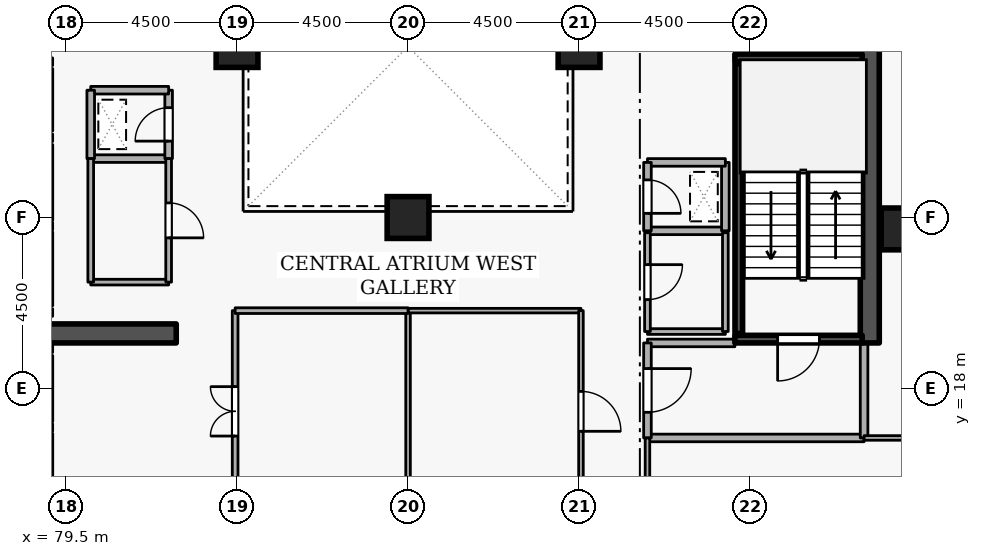
"""IFC4 building model, lengths in metres.
Left out: names, types, materials, properties, quantities, classifications, styles, units other than length and angle.
Written with IfcOpenShell. Run it as: python <this file> out.ifc"""

import sys

from ifc_helpers import new_model, si_unit, direction, frame, frame_2d, origin, origin_2d, place, context, subcontext, project, spatial, rectangle, extrude, element, fill, save


model = new_model("IFC4")
c1 = context("Model", 3, precision=1e-05, world=origin(), true_north=direction((0.0, 1.0)))
c2 = subcontext(c1, "Body", "Model", "MODEL_VIEW")
j1 = project(units=[si_unit("LENGTHUNIT", "METRE"), si_unit("PLANEANGLEUNIT", "RADIAN")], contexts=[c1])
p1 = place(None, origin())
s1 = spatial("IfcSite", under=j1, at=p1, CompositionType="ELEMENT")
p2 = place(p1, origin())
s2 = spatial("IfcBuilding", under=s1, at=p2, CompositionType="ELEMENT")
p3 = place(p2, frame((0.0, 0.0, 182.1)))
s3 = spatial("IfcBuildingStorey", under=s2, at=p3, CompositionType="ELEMENT", Elevation=182.1)
p4 = place(p3, frame((100.65, 19.2, 0.0), z_axis=(0.0, 0.0, 1.0), x_axis=(0.0, 1.0, 0.0)))
e1 = element("IfcWall", 1, at=p4, inside=s3, PredefinedType="SHEAR", context=c2, shape_type="SweptSolid", body=[
    extrude(rectangle(XDim=15.6, YDim=0.5, at=frame_2d((7.8, 0.0))), origin(), (0.0, 0.0, 1.0), 3.6),
])
p5 = place(p3, frame((76.6, 19.45, 0.0), z_axis=(0.0, 0.0, 1.0), x_axis=(1.0, 0.0, 0.0)))
e2 = element("IfcWall", 2, at=p5, inside=s3, PredefinedType="SHEAR", context=c2, shape_type="SweptSolid", body=[
    extrude(rectangle(XDim=5.8, YDim=0.5, at=frame_2d((2.9, 0.0))), origin(), (0.0, 0.0, 1.0), 3.6),
])
for number, where, z_axis, x_axis in (
    (3, (101.5, 22.2, 0.0), (0.0, 0.0, 1.0), (1.0, 0.0, 0.0)),
    (4, (93.0, 27.0, 0.0), (0.0, 0.0, 1.0), (1.0, 0.0, 0.0)),
    (5, (84.0, 27.0, 0.0), (0.0, 0.0, 1.0), (1.0, 0.0, 0.0)),
    (6, (88.5, 22.5, 0.0), (0.0, 0.0, 1.0), (1.0, 0.0, 0.0)),
):
    element("IfcColumn", number, at=place(p3, frame(where, z_axis=z_axis, x_axis=x_axis)), inside=s3, PredefinedType="COLUMN", context=c2, shape_type="SweptSolid", body=[
        extrude(rectangle(XDim=1.1, YDim=1.1, at=origin_2d()), origin(), (0.0, 0.0, 1.0), 3.6),
    ])
p6 = place(p3, frame((79.05, 24.78, 0.0), z_axis=(0.0, 0.0, 1.0), x_axis=(0.0, 1.0, 0.0)))
e7 = element("IfcWall", 7, at=p6, inside=s3, PredefinedType="STANDARD", context=c2, shape_type="SweptSolid", body=[
    extrude(rectangle(XDim=1.64, YDim=0.2, at=frame_2d((0.82, 0.0))), origin(), (0.0, 0.0, 1.0), 3.34),
])
p7 = place(p6, frame((0.31, 0.0, 0.0)))
e8 = element("IfcOpeningElement", 8, at=p7, cuts=e7, PredefinedType="OPENING", context=c2, shape_type="SweptSolid", body=[
    extrude(rectangle(XDim=1.02, YDim=2.06, at=frame_2d((0.51, 1.03))), frame((0.0, 0.11, 0.0), z_axis=(0.0, -1.0, 0.0), x_axis=(1.0, 0.0, 0.0)), (0.0, 0.0, 1.0), 0.22),
])
p8 = place(p3, frame((79.05, 22.43, 0.0), z_axis=(0.0, 0.0, 1.0), x_axis=(0.0, 1.0, 0.0)))
e9 = element("IfcWall", 9, at=p8, inside=s3, PredefinedType="STANDARD", context=c2, shape_type="SweptSolid", body=[
    extrude(rectangle(XDim=1.99, YDim=0.2, at=frame_2d((0.995, 0.0))), origin(), (0.0, 0.0, 1.0), 3.34),
])
p9 = place(p8, frame((0.485, 0.0, 0.0)))
e10 = element("IfcOpeningElement", 10, at=p9, cuts=e9, PredefinedType="OPENING", context=c2, shape_type="SweptSolid", body=[
    extrude(rectangle(XDim=1.02, YDim=2.06, at=frame_2d((0.51, 1.03))), frame((0.0, 0.11, 0.0), z_axis=(0.0, -1.0, 0.0), x_axis=(1.0, 0.0, 0.0)), (0.0, 0.0, 1.0), 0.22),
])
p10 = place(p3, frame((79.05, 20.18, 0.0), z_axis=(0.0, 0.0, 1.0), x_axis=(0.0, 1.0, 0.0)))
e11 = element("IfcWall", 11, at=p10, inside=s3, PredefinedType="STANDARD", context=c2, shape_type="SweptSolid", body=[
    extrude(rectangle(XDim=1.94, YDim=0.2, at=frame_2d((0.97, 0.0))), origin(), (0.0, 0.0, 1.0), 3.34),
])
p11 = place(p10, frame((0.46, 0.0, 0.0)))
e12 = element("IfcOpeningElement", 12, at=p11, cuts=e11, PredefinedType="OPENING", context=c2, shape_type="SweptSolid", body=[
    extrude(rectangle(XDim=1.02, YDim=2.06, at=frame_2d((0.51, 1.03))), frame((0.0, 0.11, 0.0), z_axis=(0.0, -1.0, 0.0), x_axis=(1.0, 0.0, 0.0)), (0.0, 0.0, 1.0), 0.22),
])
p12 = place(p3, frame((79.05, 17.13, 0.0), z_axis=(0.0, 0.0, 1.0), x_axis=(0.0, 1.0, 0.0)))
e13 = element("IfcWall", 13, at=p12, inside=s3, PredefinedType="STANDARD", context=c2, shape_type="SweptSolid", body=[
    extrude(rectangle(XDim=1.74, YDim=0.2, at=frame_2d((0.87, 0.0))), origin(), (0.0, 0.0, 1.0), 3.34),
])
p13 = place(p12, frame((0.36, 0.0, 0.0)))
e14 = element("IfcOpeningElement", 14, at=p13, cuts=e13, PredefinedType="OPENING", context=c2, shape_type="SweptSolid", body=[
    extrude(rectangle(XDim=1.02, YDim=2.06, at=frame_2d((0.51, 1.03))), frame((0.0, 0.11, 0.0), z_axis=(0.0, -1.0, 0.0), x_axis=(1.0, 0.0, 0.0)), (0.0, 0.0, 1.0), 0.22),
])
p14 = place(p3, frame((79.05, 15.03, 0.0), z_axis=(0.0, 0.0, 1.0), x_axis=(0.0, 1.0, 0.0)))
e15 = element("IfcWall", 15, at=p14, inside=s3, PredefinedType="STANDARD", context=c2, shape_type="SweptSolid", body=[
    extrude(rectangle(XDim=1.79, YDim=0.2, at=frame_2d((0.895, 0.0))), origin(), (0.0, 0.0, 1.0), 3.34),
])
p15 = place(p14, frame((0.385, 0.0, 0.0)))
e16 = element("IfcOpeningElement", 16, at=p15, cuts=e15, PredefinedType="OPENING", context=c2, shape_type="SweptSolid", body=[
    extrude(rectangle(XDim=1.02, YDim=2.06, at=frame_2d((0.51, 1.03))), frame((0.0, 0.11, 0.0), z_axis=(0.0, -1.0, 0.0), x_axis=(1.0, 0.0, 0.0)), (0.0, 0.0, 1.0), 0.22),
])
p16 = place(p3, frame((100.45, 19.3, 0.0), z_axis=(0.0, 0.0, 1.0), x_axis=(-1.0, 0.0, 0.0)))
e17 = element("IfcWall", 17, at=p16, inside=s3, PredefinedType="SHEAR", context=c2, shape_type="SweptSolid", body=[
    extrude(rectangle(XDim=3.35, YDim=0.2, at=frame_2d((1.675, 0.0))), origin(), (0.0, 0.0, 1.0), 3.6),
])
p17 = place(p16, frame((1.125, 0.0, 0.0)))
e18 = element("IfcOpeningElement", 18, at=p17, cuts=e17, PredefinedType="OPENING", context=c2, shape_type="SweptSolid", body=[
    extrude(rectangle(XDim=1.1, YDim=2.1, at=frame_2d((0.55, 1.05))), frame((0.0, 0.11, 0.0), z_axis=(0.0, -1.0, 0.0), x_axis=(1.0, 0.0, 0.0)), (0.0, 0.0, 1.0), 0.22),
])
p18 = place(p3, frame((97.1, 26.7, 0.0), z_axis=(0.0, 0.0, 1.0), x_axis=(1.0, 0.0, 0.0)))
e19 = element("IfcWall", 19, at=p18, inside=s3, PredefinedType="SHEAR", context=c2, shape_type="SweptSolid", body=[
    extrude(rectangle(XDim=3.35, YDim=0.2, at=frame_2d((1.675, 0.0))), origin(), (0.0, 0.0, 1.0), 3.6),
])
p19 = place(p3, frame((97.203, 26.55, 0.0), z_axis=(0.0, 0.0, 1.0), x_axis=(0.0, -1.0, 0.0)))
e20 = element("IfcWall", 20, at=p19, inside=s3, PredefinedType="SHEAR", context=c2, shape_type="SweptSolid", body=[
    extrude(rectangle(XDim=7.1, YDim=0.2, at=frame_2d((3.55, 0.0))), origin(), (0.0, 0.0, 1.0), 3.6),
])
p20 = place(p3, frame((94.8, 16.7, 0.0), z_axis=(0.0, 0.0, 1.0), x_axis=(1.0, 0.0, 0.0)))
e21 = element("IfcWall", 21, at=p20, inside=s3, PredefinedType="STANDARD", context=c2, shape_type="SweptSolid", body=[
    extrude(rectangle(XDim=5.7, YDim=0.2, at=frame_2d((2.85, 0.0))), origin(), (0.0, 0.0, 1.0), 3.34),
])
p21 = place(p3, frame((100.5, 16.7, 0.0), z_axis=(0.0, 0.0, 1.0), x_axis=(0.0, 1.0, 0.0)))
e22 = element("IfcWall", 22, at=p21, inside=s3, PredefinedType="STANDARD", context=c2, shape_type="SweptSolid", body=[
    extrude(rectangle(XDim=2.5, YDim=0.2, at=frame_2d((1.25, 0.0))), origin(), (0.0, 0.0, 1.0), 3.34),
])
p22 = place(p3, frame((97.1, 19.2, 0.0), z_axis=(0.0, 0.0, 1.0), x_axis=(-1.0, 0.0, 0.0)))
e23 = element("IfcWall", 23, at=p22, inside=s3, PredefinedType="STANDARD", context=c2, shape_type="SweptSolid", body=[
    extrude(rectangle(XDim=2.3, YDim=0.2, at=frame_2d((1.15, 0.0))), origin(), (0.0, 0.0, 1.0), 2.545),
])
p23 = place(p3, frame((94.8, 19.2, 0.0), z_axis=(0.0, 0.0, 1.0), x_axis=(0.0, -1.0, 0.0)))
e24 = element("IfcWall", 24, at=p23, inside=s3, PredefinedType="STANDARD", context=c2, shape_type="SweptSolid", body=[
    extrude(rectangle(XDim=2.5, YDim=0.2, at=frame_2d((1.25, 0.0))), origin(), (0.0, 0.0, 1.0), 3.34),
])
p24 = place(p23, frame((0.675, 0.0, 0.0)))
e25 = element("IfcOpeningElement", 25, at=p24, cuts=e24, PredefinedType="OPENING", context=c2, shape_type="SweptSolid", body=[
    extrude(rectangle(XDim=1.15, YDim=2.1, at=frame_2d((0.575, 1.05))), frame((0.0, 0.11, 0.0), z_axis=(0.0, -1.0, 0.0), x_axis=(1.0, 0.0, 0.0)), (0.0, 0.0, 1.0), 0.22),
])
p25 = place(p3, frame((94.8, 22.15, 0.0), z_axis=(0.0, 0.0, 1.0), x_axis=(1.0, 0.0, 0.0)))
e26 = element("IfcWall", 26, at=p25, inside=s3, PredefinedType="STANDARD", context=c2, shape_type="SweptSolid", body=[
    extrude(rectangle(XDim=2.05, YDim=0.2, at=frame_2d((1.025, 0.0))), origin(), (0.0, 0.0, 1.0), 3.34),
])
p26 = place(p3, frame((96.85, 22.15, 0.0), z_axis=(0.0, 0.0, 1.0), x_axis=(0.0, 1.0, 0.0)))
e27 = element("IfcWall", 27, at=p26, inside=s3, PredefinedType="STANDARD", context=c2, shape_type="SweptSolid", body=[
    extrude(rectangle(XDim=1.8, YDim=0.2, at=frame_2d((0.9, 0.0))), origin(), (0.0, 0.0, 1.0), 3.34),
])
p27 = place(p3, frame((96.85, 23.95, 0.0), z_axis=(0.0, 0.0, 1.0), x_axis=(-1.0, 0.0, 0.0)))
e28 = element("IfcWall", 28, at=p27, inside=s3, PredefinedType="STANDARD", context=c2, shape_type="SweptSolid", body=[
    extrude(rectangle(XDim=2.05, YDim=0.2, at=frame_2d((1.025, 0.0))), origin(), (0.0, 0.0, 1.0), 3.34),
])
p28 = place(p3, frame((94.8, 23.95, 0.0), z_axis=(0.0, 0.0, 1.0), x_axis=(0.0, -1.0, 0.0)))
e29 = element("IfcWall", 29, at=p28, inside=s3, PredefinedType="STANDARD", context=c2, shape_type="SweptSolid", body=[
    extrude(rectangle(XDim=1.8, YDim=0.2, at=frame_2d((0.9, 0.0))), origin(), (0.0, 0.0, 1.0), 3.34),
])
p29 = place(p28, frame((0.46, 0.0, 0.0)))
e30 = element("IfcOpeningElement", 30, at=p29, cuts=e29, PredefinedType="OPENING", context=c2, shape_type="SweptSolid", body=[
    extrude(rectangle(XDim=0.88, YDim=2.04, at=frame_2d((0.44, 1.02))), frame((0.0, 0.11, 0.0), z_axis=(0.0, -1.0, 0.0), x_axis=(1.0, 0.0, 0.0)), (0.0, 0.0, 1.0), 0.22),
])
p30 = place(p3, frame((80.15, 24.05, 0.0), z_axis=(0.0, 0.0, 1.0), x_axis=(1.0, 0.0, 0.0)))
e31 = element("IfcWall", 31, at=p30, inside=s3, PredefinedType="STANDARD", context=c2, shape_type="SweptSolid", body=[
    extrude(rectangle(XDim=2.05, YDim=0.2, at=frame_2d((1.025, 0.0))), origin(), (0.0, 0.0, 1.0), 3.34),
])
p31 = place(p3, frame((82.2, 24.05, 0.0), z_axis=(0.0, 0.0, 1.0), x_axis=(0.0, 1.0, 0.0)))
e32 = element("IfcWall", 32, at=p31, inside=s3, PredefinedType="STANDARD", context=c2, shape_type="SweptSolid", body=[
    extrude(rectangle(XDim=1.8, YDim=0.2, at=frame_2d((0.9, 0.0))), origin(), (0.0, 0.0, 1.0), 3.34),
])
p32 = place(p31, frame((0.46, 0.0, 0.0)))
e33 = element("IfcOpeningElement", 33, at=p32, cuts=e32, PredefinedType="OPENING", context=c2, shape_type="SweptSolid", body=[
    extrude(rectangle(XDim=0.88, YDim=2.04, at=frame_2d((0.44, 1.02))), frame((0.0, 0.11, 0.0), z_axis=(0.0, -1.0, 0.0), x_axis=(1.0, 0.0, 0.0)), (0.0, 0.0, 1.0), 0.22),
])
p33 = place(p3, frame((82.2, 25.85, 0.0), z_axis=(0.0, 0.0, 1.0), x_axis=(-1.0, 0.0, 0.0)))
e34 = element("IfcWall", 34, at=p33, inside=s3, PredefinedType="STANDARD", context=c2, shape_type="SweptSolid", body=[
    extrude(rectangle(XDim=2.05, YDim=0.2, at=frame_2d((1.025, 0.0))), origin(), (0.0, 0.0, 1.0), 3.34),
])
p34 = place(p3, frame((80.15, 25.85, 0.0), z_axis=(0.0, 0.0, 1.0), x_axis=(0.0, -1.0, 0.0)))
e35 = element("IfcWall", 35, at=p34, inside=s3, PredefinedType="STANDARD", context=c2, shape_type="SweptSolid", body=[
    extrude(rectangle(XDim=1.8, YDim=0.2, at=frame_2d((0.9, 0.0))), origin(), (0.0, 0.0, 1.0), 3.34),
])
p35 = place(p3, frame((94.8, 19.5, 0.0), z_axis=(0.0, 0.0, 1.0), x_axis=(1.0, 0.0, 0.0)))
e36 = element("IfcWall", 36, at=p35, inside=s3, PredefinedType="PARTITIONING", context=c2, shape_type="SweptSolid", body=[
    extrude(rectangle(XDim=2.05, YDim=0.15, at=frame_2d((1.025, 0.0))), origin(), (0.0, 0.0, 1.0), 2.545),
])
p36 = place(p3, frame((96.85, 19.5, 0.0), z_axis=(0.0, 0.0, 1.0), x_axis=(0.0, 1.0, 0.0)))
e37 = element("IfcWall", 37, at=p36, inside=s3, PredefinedType="PARTITIONING", context=c2, shape_type="SweptSolid", body=[
    extrude(rectangle(XDim=2.6, YDim=0.15, at=frame_2d((1.3, 0.0))), origin(), (0.0, 0.0, 1.0), 3.34),
])
p37 = place(p3, frame((94.8, 22.1, 0.0), z_axis=(0.0, 0.0, 1.0), x_axis=(0.0, -1.0, 0.0)))
e38 = element("IfcWall", 38, at=p37, inside=s3, PredefinedType="PARTITIONING", context=c2, shape_type="SweptSolid", body=[
    extrude(rectangle(XDim=2.6, YDim=0.15, at=frame_2d((1.3, 0.0))), origin(), (0.0, 0.0, 1.0), 3.34),
])
p38 = place(p37, frame((0.84, 0.0, 0.0)))
e39 = element("IfcOpeningElement", 39, at=p38, cuts=e38, PredefinedType="OPENING", context=c2, shape_type="SweptSolid", body=[
    extrude(rectangle(XDim=0.92, YDim=2.08, at=frame_2d((0.46, 1.04))), frame((0.0, 0.085, 0.0), z_axis=(0.0, -1.0, 0.0), x_axis=(1.0, 0.0, 0.0)), (0.0, 0.0, 1.0), 0.17),
])
p39 = place(p3, frame((82.2, 20.8, 0.0), z_axis=(0.0, 0.0, 1.0), x_axis=(-1.0, 0.0, 0.0)))
e40 = element("IfcWall", 40, at=p39, inside=s3, PredefinedType="PARTITIONING", context=c2, shape_type="SweptSolid", body=[
    extrude(rectangle(XDim=2.05, YDim=0.15, at=frame_2d((1.025, 0.0))), origin(), (0.0, 0.0, 1.0), 3.34),
])
p40 = place(p3, frame((80.15, 20.8, 0.0), z_axis=(0.0, 0.0, 1.0), x_axis=(0.0, 1.0, 0.0)))
e41 = element("IfcWall", 41, at=p40, inside=s3, PredefinedType="PARTITIONING", context=c2, shape_type="SweptSolid", body=[
    extrude(rectangle(XDim=3.25, YDim=0.15, at=frame_2d((1.625, 0.0))), origin(), (0.0, 0.0, 1.0), 3.34),
])
p41 = place(p3, frame((82.2, 24.05, 0.0), z_axis=(0.0, 0.0, 1.0), x_axis=(0.0, -1.0, 0.0)))
e42 = element("IfcWall", 42, at=p41, inside=s3, PredefinedType="PARTITIONING", context=c2, shape_type="SweptSolid", body=[
    extrude(rectangle(XDim=3.25, YDim=0.15, at=frame_2d((1.625, 0.0))), origin(), (0.0, 0.0, 1.0), 3.34),
])
p42 = place(p41, frame((1.165, 0.0, 0.0)))
e43 = element("IfcOpeningElement", 43, at=p42, cuts=e42, PredefinedType="OPENING", context=c2, shape_type="SweptSolid", body=[
    extrude(rectangle(XDim=0.92, YDim=2.08, at=frame_2d((0.46, 1.04))), frame((0.0, 0.085, 0.0), z_axis=(0.0, -1.0, 0.0), x_axis=(1.0, 0.0, 0.0)), (0.0, 0.0, 1.0), 0.17),
])
p43 = place(p3, frame((88.5, 9.28, 0.0), z_axis=(0.0, 0.0, 1.0), x_axis=(0.0, 1.0, 0.0)))
e44 = element("IfcWall", 44, at=p43, inside=s3, PredefinedType="PARTITIONING", context=c2, shape_type="SweptSolid", body=[
    extrude(rectangle(XDim=10.77, YDim=0.12, at=frame_2d((5.385, 0.0))), origin(), (0.0, 0.0, 1.0), 2.932),
])
p44 = place(p3, frame((88.5, 20.05, 0.0), z_axis=(0.0, 0.0, 1.0), x_axis=(1.0, 0.0, 0.0)))
e45 = element("IfcWall", 45, at=p44, inside=s3, PredefinedType="PARTITIONING", context=c2, shape_type="SweptSolid", body=[
    extrude(rectangle(XDim=4.55, YDim=0.12, at=frame_2d((2.275, 0.0))), origin(), (0.0, 0.0, 1.0), 3.34),
])
p45 = place(p3, frame((93.05, 20.05, 0.0), z_axis=(0.0, 0.0, 1.0), x_axis=(0.0, -1.0, 0.0)))
e46 = element("IfcWall", 46, at=p45, inside=s3, PredefinedType="PARTITIONING", context=c2, shape_type="SweptSolid", body=[
    extrude(rectangle(XDim=5.3, YDim=0.12, at=frame_2d((2.65, 0.0))), origin(), (0.0, 0.0, 1.0), 3.34),
])
p46 = place(p45, frame((2.125, 0.0, 0.0)))
e47 = element("IfcOpeningElement", 47, at=p46, cuts=e46, PredefinedType="OPENING", context=c2, shape_type="SweptSolid", body=[
    extrude(rectangle(XDim=1.05, YDim=2.1, at=frame_2d((0.525, 1.05))), frame((0.0, 0.07, 0.0), z_axis=(0.0, -1.0, 0.0), x_axis=(1.0, 0.0, 0.0)), (0.0, 0.0, 1.0), 0.14),
])
p47 = place(p3, frame((94.8, 14.75, 0.0), z_axis=(0.0, 0.0, 1.0), x_axis=(0.0, 1.0, 0.0)))
e48 = element("IfcWall", 48, at=p47, inside=s3, PredefinedType="PARTITIONING", context=c2, shape_type="SweptSolid", body=[
    extrude(rectangle(XDim=1.95, YDim=0.12, at=frame_2d((0.975, 0.0))), origin(), (0.0, 0.0, 1.0), 3.34),
])
p48 = place(p3, frame((100.5, 16.7, 0.0), z_axis=(0.0, 0.0, 1.0), x_axis=(1.0, 0.0, 0.0)))
e49 = element("IfcWall", 49, at=p48, inside=s3, PredefinedType="PARTITIONING", context=c2, shape_type="SweptSolid", body=[
    extrude(rectangle(XDim=5.72, YDim=0.12, at=frame_2d((2.86, 0.0))), origin(), (0.0, 0.0, 1.0), 3.34),
])
p49 = place(p3, frame((83.95, 14.75, 0.0), z_axis=(0.0, 0.0, 1.0), x_axis=(0.0, 1.0, 0.0)))
e50 = element("IfcWall", 50, at=p49, inside=s3, PredefinedType="PARTITIONING", context=c2, shape_type="SweptSolid", body=[
    extrude(rectangle(XDim=5.3, YDim=0.15, at=frame_2d((2.65, 0.0))), origin(), (0.0, 0.0, 1.0), 3.34),
])
p50 = place(p49, frame((2.0, 0.0, 0.0)))
e51 = element("IfcOpeningElement", 51, at=p50, cuts=e50, PredefinedType="OPENING", context=c2, shape_type="SweptSolid", body=[
    extrude(rectangle(XDim=1.3, YDim=2.12, at=frame_2d((0.65, 1.06))), frame((0.0, 0.085, 0.0), z_axis=(0.0, -1.0, 0.0), x_axis=(1.0, 0.0, 0.0)), (0.0, 0.0, 1.0), 0.17),
])
p51 = place(p3, frame((83.95, 20.05, 0.0), z_axis=(0.0, 0.0, 1.0), x_axis=(1.0, 0.0, 0.0)))
e52 = element("IfcWall", 52, at=p51, inside=s3, PredefinedType="PARTITIONING", context=c2, shape_type="SweptSolid", body=[
    extrude(rectangle(XDim=4.55, YDim=0.15, at=frame_2d((2.275, 0.0))), origin(), (0.0, 0.0, 1.0), 3.34),
])
p52 = place(p17, origin())
e53 = element("IfcDoor", 53, at=p52, inside=s3, OperationType="SINGLE_SWING_RIGHT", PredefinedType="DOOR", context=c2, shape_type="SweptSolid", body=[
    extrude(rectangle(XDim=1.1, YDim=2.1, at=frame_2d((0.55, 1.05))), frame((0.0, 0.025, 0.0), z_axis=(0.0, -1.0, 0.0), x_axis=(1.0, 0.0, 0.0)), (0.0, 0.0, 1.0), 0.05),
])
fill(e18, e53)
p53 = place(p24, origin())
e54 = element("IfcDoor", 54, at=p53, inside=s3, OperationType="SINGLE_SWING_LEFT", PredefinedType="DOOR", context=c2, shape_type="SweptSolid", body=[
    extrude(rectangle(XDim=1.15, YDim=2.1, at=frame_2d((0.575, 1.05))), frame((0.0, 0.025, 0.0), z_axis=(0.0, -1.0, 0.0), x_axis=(1.0, 0.0, 0.0)), (0.0, 0.0, 1.0), 0.05),
])
fill(e25, e54)
p54 = place(p29, origin())
e55 = element("IfcDoor", 55, at=p54, inside=s3, OperationType="SINGLE_SWING_RIGHT", PredefinedType="DOOR", context=c2, shape_type="SweptSolid", body=[
    extrude(rectangle(XDim=0.88, YDim=2.04, at=frame_2d((0.44, 1.02))), frame((0.0, 0.025, 0.0), z_axis=(0.0, -1.0, 0.0), x_axis=(1.0, 0.0, 0.0)), (0.0, 0.0, 1.0), 0.05),
])
fill(e30, e55)
p55 = place(p32, origin())
e56 = element("IfcDoor", 56, at=p55, inside=s3, OperationType="SINGLE_SWING_LEFT", PredefinedType="DOOR", context=c2, shape_type="SweptSolid", body=[
    extrude(rectangle(XDim=0.88, YDim=2.04, at=frame_2d((0.44, 1.02))), frame((0.0, 0.025, 0.0), z_axis=(0.0, -1.0, 0.0), x_axis=(1.0, 0.0, 0.0)), (0.0, 0.0, 1.0), 0.05),
])
fill(e33, e56)
p56 = place(p38, origin())
e57 = element("IfcDoor", 57, at=p56, inside=s3, OperationType="SINGLE_SWING_LEFT", PredefinedType="DOOR", context=c2, shape_type="SweptSolid", body=[
    extrude(rectangle(XDim=0.92, YDim=2.08, at=frame_2d((0.46, 1.04))), frame((0.0, 0.025, 0.0), z_axis=(0.0, -1.0, 0.0), x_axis=(1.0, 0.0, 0.0)), (0.0, 0.0, 1.0), 0.05),
])
fill(e39, e57)
p57 = place(p42, origin())
e58 = element("IfcDoor", 58, at=p57, inside=s3, OperationType="SINGLE_SWING_RIGHT", PredefinedType="DOOR", context=c2, shape_type="SweptSolid", body=[
    extrude(rectangle(XDim=0.92, YDim=2.08, at=frame_2d((0.46, 1.04))), frame((0.0, 0.025, 0.0), z_axis=(0.0, -1.0, 0.0), x_axis=(1.0, 0.0, 0.0)), (0.0, 0.0, 1.0), 0.05),
])
fill(e43, e58)
p58 = place(p46, origin())
e59 = element("IfcDoor", 59, at=p58, inside=s3, OperationType="SINGLE_SWING_RIGHT", PredefinedType="DOOR", context=c2, shape_type="SweptSolid", body=[
    extrude(rectangle(XDim=1.05, YDim=2.1, at=frame_2d((0.525, 1.05))), frame((0.0, 0.025, 0.0), z_axis=(0.0, -1.0, 0.0), x_axis=(1.0, 0.0, 0.0)), (0.0, 0.0, 1.0), 0.05),
])
fill(e47, e59)
p59 = place(p50, origin())
e60 = element("IfcDoor", 60, at=p59, inside=s3, OperationType="DOUBLE_DOOR_SINGLE_SWING", PredefinedType="DOOR", context=c2, shape_type="SweptSolid", body=[
    extrude(rectangle(XDim=1.3, YDim=2.12, at=frame_2d((0.65, 1.06))), frame((0.0, 0.025, 0.0), z_axis=(0.0, -1.0, 0.0), x_axis=(1.0, 0.0, 0.0)), (0.0, 0.0, 1.0), 0.05),
])
fill(e51, e60)
save(model, sys.argv[1])
